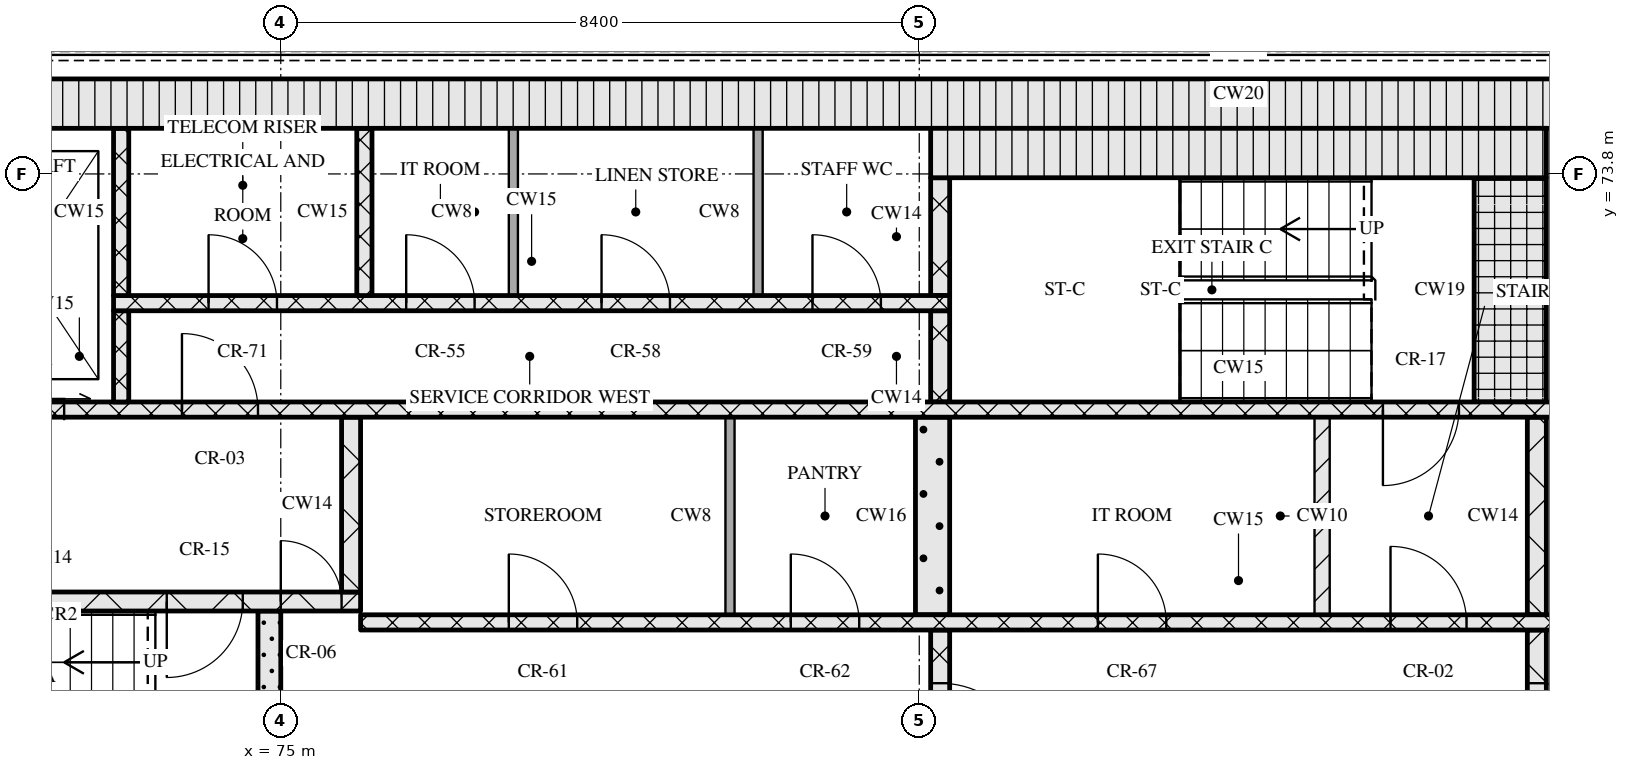
"""IFC4 building model, lengths in metres.
Left out: names, types, materials, properties, quantities, classifications, styles, units other than length and angle.
Written with IfcOpenShell. Run it as: python <this file> out.ifc"""

import sys

from ifc_helpers import new_model, si_unit, direction, frame, frame_2d, origin, place, context, subcontext, project, spatial, rectangle, extrude, element, fill, save


model = new_model("IFC4")
c1 = context("Model", 3, precision=1e-05, world=origin(), true_north=direction((0.0, 1.0)))
c2 = subcontext(c1, "Body", "Model", "MODEL_VIEW")
j1 = project(units=[si_unit("LENGTHUNIT", "METRE"), si_unit("PLANEANGLEUNIT", "RADIAN")], contexts=[c1])
p1 = place(None, origin())
s1 = spatial("IfcSite", under=j1, at=p1, CompositionType="ELEMENT")
p2 = place(p1, origin())
s2 = spatial("IfcBuilding", under=s1, at=p2, CompositionType="ELEMENT")
p3 = place(p2, frame((0.0, 0.0, 248.7)))
s3 = spatial("IfcBuildingStorey", under=s2, at=p3, CompositionType="ELEMENT", Elevation=248.7)
p4 = place(p3, frame((67.15, 74.725, 0.0), z_axis=(0.0, 0.0, 1.0), x_axis=(1.0, 0.0, 0.0)))
e1 = element("IfcWall", 1, at=p4, inside=s3, PredefinedType="SOLIDWALL", context=c2, shape_type="SweptSolid", body=[
    extrude(rectangle(XDim=40.9, YDim=0.65, at=frame_2d((20.45, 0.0))), origin(), (0.0, 0.0, 1.0), 3.3),
])
p5 = place(p3, frame((74.85, 65.2, 0.0), z_axis=(0.0, 0.0, 1.0), x_axis=(0.0, 1.0, 0.0)))
e2 = element("IfcWall", 2, at=p5, inside=s3, PredefinedType="SOLIDWALL", context=c2, shape_type="SweptSolid", body=[
    extrude(rectangle(XDim=2.85, YDim=0.3, at=frame_2d((1.425, 0.0))), origin(), (0.0, 0.0, 1.0), 3.3),
])
p6 = place(p3, frame((83.675, 65.2, 0.0), z_axis=(0.0, 0.0, 1.0), x_axis=(0.0, 1.0, 0.0)))
e3 = element("IfcWall", 3, at=p6, inside=s3, PredefinedType="SOLIDWALL", context=c2, shape_type="SweptSolid", body=[
    extrude(rectangle(XDim=2.6, YDim=0.25, at=frame_2d((1.3, 0.0))), origin(), (0.0, 0.0, 1.0), 3.3),
])
p7 = place(p6, frame((0.7, 0.0, 0.0)))
e4 = element("IfcOpeningElement", 4, at=p7, cuts=e3, PredefinedType="OPENING", context=c2, shape_type="SweptSolid", body=[
    extrude(rectangle(XDim=1.2, YDim=2.1, at=frame_2d((0.6, 1.05))), frame((0.0, 0.135, 0.0), z_axis=(0.0, -1.0, 0.0), x_axis=(1.0, 0.0, 0.0)), (0.0, 0.0, 1.0), 0.27),
])
p8 = place(p3, frame((91.525, 65.2, 0.0), z_axis=(0.0, 0.0, 1.0), x_axis=(0.0, 1.0, 0.0)))
e5 = element("IfcWall", 5, at=p8, inside=s3, PredefinedType="SOLIDWALL", context=c2, shape_type="SweptSolid", body=[
    extrude(rectangle(XDim=2.6, YDim=0.25, at=frame_2d((1.3, 0.0))), origin(), (0.0, 0.0, 1.0), 3.3),
])
p9 = place(p8, frame((0.7, 0.0, 0.0)))
e6 = element("IfcOpeningElement", 6, at=p9, cuts=e5, PredefinedType="OPENING", context=c2, shape_type="SweptSolid", body=[
    extrude(rectangle(XDim=1.2, YDim=2.1, at=frame_2d((0.6, 1.05))), frame((0.0, 0.135, 0.0), z_axis=(0.0, -1.0, 0.0), x_axis=(1.0, 0.0, 0.0)), (0.0, 0.0, 1.0), 0.27),
])
p10 = place(p3, frame((76.05, 67.9, 0.0), z_axis=(0.0, 0.0, 1.0), x_axis=(1.0, 0.0, 0.0)))
e7 = element("IfcWall", 7, at=p10, inside=s3, PredefinedType="SOLIDWALL", context=c2, shape_type="SweptSolid", body=[
    extrude(rectangle(XDim=23.1, YDim=0.2, at=frame_2d((11.55, 0.0))), origin(), (0.0, 0.0, 1.0), 3.3),
])
p11 = place(p10, frame((1.95, 0.0, 0.0)))
e8 = element("IfcOpeningElement", 8, at=p11, cuts=e7, PredefinedType="OPENING", context=c2, shape_type="SweptSolid", body=[
    extrude(rectangle(XDim=0.9, YDim=2.1, at=frame_2d((0.45, 1.05))), frame((0.0, 0.11, 0.0), z_axis=(0.0, -1.0, 0.0), x_axis=(1.0, 0.0, 0.0)), (0.0, 0.0, 1.0), 0.22),
])
p12 = place(p10, frame((5.66, 0.0, 0.0)))
e9 = element("IfcOpeningElement", 9, at=p12, cuts=e7, PredefinedType="OPENING", context=c2, shape_type="SweptSolid", body=[
    extrude(rectangle(XDim=0.9, YDim=2.1, at=frame_2d((0.45, 1.05))), frame((0.0, 0.11, 0.0), z_axis=(0.0, -1.0, 0.0), x_axis=(1.0, 0.0, 0.0)), (0.0, 0.0, 1.0), 0.22),
])
p13 = place(p10, frame((9.7, 0.0, 0.0)))
e10 = element("IfcOpeningElement", 10, at=p13, cuts=e7, PredefinedType="OPENING", context=c2, shape_type="SweptSolid", body=[
    extrude(rectangle(XDim=0.9, YDim=2.1, at=frame_2d((0.45, 1.05))), frame((0.0, 0.11, 0.0), z_axis=(0.0, -1.0, 0.0), x_axis=(1.0, 0.0, 0.0)), (0.0, 0.0, 1.0), 0.22),
])
p14 = place(p10, frame((13.55, 0.0, 0.0)))
e11 = element("IfcOpeningElement", 11, at=p14, cuts=e7, PredefinedType="OPENING", context=c2, shape_type="SweptSolid", body=[
    extrude(rectangle(XDim=1.0, YDim=2.1, at=frame_2d((0.5, 1.05))), frame((0.0, 0.11, 0.0), z_axis=(0.0, -1.0, 0.0), x_axis=(1.0, 0.0, 0.0)), (0.0, 0.0, 1.0), 0.22),
])
p15 = place(p10, frame((16.2, 0.0, 0.0)))
e12 = element("IfcOpeningElement", 12, at=p15, cuts=e7, PredefinedType="OPENING", context=c2, shape_type="SweptSolid", body=[
    extrude(rectangle(XDim=1.1, YDim=2.1, at=frame_2d((0.55, 1.05))), frame((0.0, 0.11, 0.0), z_axis=(0.0, -1.0, 0.0), x_axis=(1.0, 0.0, 0.0)), (0.0, 0.0, 1.0), 0.22),
])
p16 = place(p10, frame((18.7, 0.0, 0.0)))
e13 = element("IfcOpeningElement", 13, at=p16, cuts=e7, PredefinedType="OPENING", context=c2, shape_type="SweptSolid", body=[
    extrude(rectangle(XDim=1.1, YDim=2.1, at=frame_2d((0.55, 1.05))), frame((0.0, 0.11, 0.0), z_axis=(0.0, -1.0, 0.0), x_axis=(1.0, 0.0, 0.0)), (0.0, 0.0, 1.0), 0.22),
])
p17 = place(p10, frame((21.2, 0.0, 0.0)))
e14 = element("IfcOpeningElement", 14, at=p17, cuts=e7, PredefinedType="OPENING", context=c2, shape_type="SweptSolid", body=[
    extrude(rectangle(XDim=1.1, YDim=2.1, at=frame_2d((0.55, 1.05))), frame((0.0, 0.11, 0.0), z_axis=(0.0, -1.0, 0.0), x_axis=(1.0, 0.0, 0.0)), (0.0, 0.0, 1.0), 0.22),
])
p18 = place(p3, frame((80.91, 68.0, 0.0), z_axis=(0.0, 0.0, 1.0), x_axis=(0.0, 1.0, 0.0)))
e15 = element("IfcWall", 15, at=p18, inside=s3, PredefinedType="PARTITIONING", context=c2, shape_type="SweptSolid", body=[
    extrude(rectangle(XDim=2.6, YDim=0.12, at=frame_2d((1.3, 0.0))), origin(), (0.0, 0.0, 1.0), 3.3),
])
p19 = place(p3, frame((83.575, 68.0, 0.0), z_axis=(0.0, 0.0, 1.0), x_axis=(0.0, 1.0, 0.0)))
e16 = element("IfcWall", 16, at=p19, inside=s3, PredefinedType="SOLIDWALL", context=c2, shape_type="SweptSolid", body=[
    extrude(rectangle(XDim=2.6, YDim=0.45, at=frame_2d((1.3, 0.0))), origin(), (0.0, 0.0, 1.0), 3.3),
])
p20 = place(p3, frame((88.7, 68.0, 0.0), z_axis=(0.0, 0.0, 1.0), x_axis=(0.0, 1.0, 0.0)))
e17 = element("IfcWall", 17, at=p20, inside=s3, PredefinedType="PARTITIONING", context=c2, shape_type="SweptSolid", body=[
    extrude(rectangle(XDim=2.6, YDim=0.2, at=frame_2d((1.3, 0.0))), origin(), (0.0, 0.0, 1.0), 3.3),
])
p21 = place(p3, frame((91.525, 68.0, 0.0), z_axis=(0.0, 0.0, 1.0), x_axis=(0.0, 1.0, 0.0)))
e18 = element("IfcWall", 18, at=p21, inside=s3, PredefinedType="SOLIDWALL", context=c2, shape_type="SweptSolid", body=[
    extrude(rectangle(XDim=2.6, YDim=0.25, at=frame_2d((1.3, 0.0))), origin(), (0.0, 0.0, 1.0), 3.3),
])
p22 = place(p3, frame((67.8, 68.175, 0.0), z_axis=(0.0, 0.0, 1.0), x_axis=(1.0, 0.0, 0.0)))
e19 = element("IfcWall", 19, at=p22, inside=s3, PredefinedType="SOLIDWALL", context=c2, shape_type="SweptSolid", body=[
    extrude(rectangle(XDim=8.25, YDim=0.25, at=frame_2d((4.125, 0.0))), origin(), (0.0, 0.0, 1.0), 3.3),
])
p23 = place(p22, frame((5.7, 0.0, 0.0)))
e20 = element("IfcOpeningElement", 20, at=p23, cuts=e19, PredefinedType="OPENING", context=c2, shape_type="SweptSolid", body=[
    extrude(rectangle(XDim=1.0, YDim=2.1, at=frame_2d((0.5, 1.05))), frame((0.0, 0.135, 0.0), z_axis=(0.0, -1.0, 0.0), x_axis=(1.0, 0.0, 0.0)), (0.0, 0.0, 1.0), 0.27),
])
p24 = place(p22, frame((7.2, 0.0, 0.0)))
e21 = element("IfcOpeningElement", 21, at=p24, cuts=e19, PredefinedType="OPENING", context=c2, shape_type="SweptSolid", body=[
    extrude(rectangle(XDim=0.8, YDim=2.1, at=frame_2d((0.4, 1.05))), frame((0.0, 0.135, 0.0), z_axis=(0.0, -1.0, 0.0), x_axis=(1.0, 0.0, 0.0)), (0.0, 0.0, 1.0), 0.27),
])
p25 = place(p3, frame((75.925, 68.3, 0.0), z_axis=(0.0, 0.0, 1.0), x_axis=(0.0, 1.0, 0.0)))
e22 = element("IfcWall", 22, at=p25, inside=s3, PredefinedType="SOLIDWALL", context=c2, shape_type="SweptSolid", body=[
    extrude(rectangle(XDim=2.3, YDim=0.25, at=frame_2d((1.15, 0.0))), origin(), (0.0, 0.0, 1.0), 3.3),
])
p26 = place(p3, frame((67.8, 70.7, 0.0), z_axis=(0.0, 0.0, 1.0), x_axis=(1.0, 0.0, 0.0)))
e23 = element("IfcWall", 23, at=p26, inside=s3, PredefinedType="SOLIDWALL", context=c2, shape_type="SweptSolid", body=[
    extrude(rectangle(XDim=39.6, YDim=0.2, at=frame_2d((19.8, 0.0))), origin(), (0.0, 0.0, 1.0), 3.3),
])
p27 = place(p26, frame((0.65, 0.0, 0.0)))
e24 = element("IfcOpeningElement", 24, at=p27, cuts=e23, PredefinedType="OPENING", context=c2, shape_type="SweptSolid", body=[
    extrude(rectangle(XDim=1.1, YDim=2.1, at=frame_2d((0.55, 1.05))), frame((0.0, 0.11, 0.0), z_axis=(0.0, -1.0, 0.0), x_axis=(1.0, 0.0, 0.0)), (0.0, 0.0, 1.0), 0.22),
])
p28 = place(p26, frame((3.25, 0.0, 0.0)))
e25 = element("IfcOpeningElement", 25, at=p28, cuts=e23, PredefinedType="OPENING", context=c2, shape_type="SweptSolid", body=[
    extrude(rectangle(XDim=1.1, YDim=2.1, at=frame_2d((0.55, 1.05))), frame((0.0, 0.11, 0.0), z_axis=(0.0, -1.0, 0.0), x_axis=(1.0, 0.0, 0.0)), (0.0, 0.0, 1.0), 0.22),
])
p29 = place(p26, frame((5.9, 0.0, 0.0)))
e26 = element("IfcOpeningElement", 26, at=p29, cuts=e23, PredefinedType="OPENING", context=c2, shape_type="SweptSolid", body=[
    extrude(rectangle(XDim=1.0, YDim=2.1, at=frame_2d((0.5, 1.05))), frame((0.0, 0.11, 0.0), z_axis=(0.0, -1.0, 0.0), x_axis=(1.0, 0.0, 0.0)), (0.0, 0.0, 1.0), 0.22),
])
p30 = place(p26, frame((21.7, 0.0, 0.0)))
e27 = element("IfcOpeningElement", 27, at=p30, cuts=e23, PredefinedType="OPENING", context=c2, shape_type="SweptSolid", body=[
    extrude(rectangle(XDim=1.0, YDim=2.1, at=frame_2d((0.5, 1.05))), frame((0.0, 0.11, 0.0), z_axis=(0.0, -1.0, 0.0), x_axis=(1.0, 0.0, 0.0)), (0.0, 0.0, 1.0), 0.22),
])
p31 = place(p26, frame((32.7, 0.0, 0.0)))
e28 = element("IfcOpeningElement", 28, at=p31, cuts=e23, PredefinedType="OPENING", context=c2, shape_type="SweptSolid", body=[
    extrude(rectangle(XDim=1.0, YDim=2.1, at=frame_2d((0.5, 1.05))), frame((0.0, 0.11, 0.0), z_axis=(0.0, -1.0, 0.0), x_axis=(1.0, 0.0, 0.0)), (0.0, 0.0, 1.0), 0.22),
])
p32 = place(p26, frame((35.25, 0.0, 0.0)))
e29 = element("IfcOpeningElement", 29, at=p32, cuts=e23, PredefinedType="OPENING", context=c2, shape_type="SweptSolid", body=[
    extrude(rectangle(XDim=1.1, YDim=2.1, at=frame_2d((0.55, 1.05))), frame((0.0, 0.11, 0.0), z_axis=(0.0, -1.0, 0.0), x_axis=(1.0, 0.0, 0.0)), (0.0, 0.0, 1.0), 0.22),
])
p33 = place(p26, frame((37.85, 0.0, 0.0)))
e30 = element("IfcOpeningElement", 30, at=p33, cuts=e23, PredefinedType="OPENING", context=c2, shape_type="SweptSolid", body=[
    extrude(rectangle(XDim=1.1, YDim=2.1, at=frame_2d((0.55, 1.05))), frame((0.0, 0.11, 0.0), z_axis=(0.0, -1.0, 0.0), x_axis=(1.0, 0.0, 0.0)), (0.0, 0.0, 1.0), 0.22),
])
p34 = place(p3, frame((72.9, 70.8, 0.0), z_axis=(0.0, 0.0, 1.0), x_axis=(0.0, 1.0, 0.0)))
e31 = element("IfcWall", 31, at=p34, inside=s3, PredefinedType="SOLIDWALL", context=c2, shape_type="SweptSolid", body=[
    extrude(rectangle(XDim=1.2, YDim=0.2, at=frame_2d((0.6, 0.0))), origin(), (0.0, 0.0, 1.0), 3.3),
])
p35 = place(p3, frame((83.675, 70.8, 0.0), z_axis=(0.0, 0.0, 1.0), x_axis=(0.0, 1.0, 0.0)))
e32 = element("IfcWall", 32, at=p35, inside=s3, PredefinedType="SOLIDWALL", context=c2, shape_type="SweptSolid", body=[
    extrude(rectangle(XDim=1.2, YDim=0.25, at=frame_2d((0.6, 0.0))), origin(), (0.0, 0.0, 1.0), 3.3),
])
p36 = place(p3, frame((91.175, 70.8, 0.0), z_axis=(0.0, 0.0, 1.0), x_axis=(0.0, 1.0, 0.0)))
e33 = element("IfcWall", 33, at=p36, inside=s3, PredefinedType="SOLIDWALL", context=c2, shape_type="SweptSolid", body=[
    extrude(rectangle(XDim=2.95, YDim=0.95, at=frame_2d((1.475, 0.0))), origin(), (0.0, 0.0, 1.0), 3.3),
])
p37 = place(p3, frame((72.8, 72.1, 0.0), z_axis=(0.0, 0.0, 1.0), x_axis=(1.0, 0.0, 0.0)))
e34 = element("IfcWall", 34, at=p37, inside=s3, PredefinedType="SOLIDWALL", context=c2, shape_type="SweptSolid", body=[
    extrude(rectangle(XDim=11.0, YDim=0.2, at=frame_2d((5.5, 0.0))), origin(), (0.0, 0.0, 1.0), 3.3),
])
p38 = place(p37, frame((1.25, 0.0, 0.0)))
e35 = element("IfcOpeningElement", 35, at=p38, cuts=e34, PredefinedType="OPENING", context=c2, shape_type="SweptSolid", body=[
    extrude(rectangle(XDim=0.9, YDim=2.1, at=frame_2d((0.45, 1.05))), frame((0.0, 0.11, 0.0), z_axis=(0.0, -1.0, 0.0), x_axis=(1.0, 0.0, 0.0)), (0.0, 0.0, 1.0), 0.22),
])
p39 = place(p37, frame((3.85, 0.0, 0.0)))
e36 = element("IfcOpeningElement", 36, at=p39, cuts=e34, PredefinedType="OPENING", context=c2, shape_type="SweptSolid", body=[
    extrude(rectangle(XDim=0.9, YDim=2.1, at=frame_2d((0.45, 1.05))), frame((0.0, 0.11, 0.0), z_axis=(0.0, -1.0, 0.0), x_axis=(1.0, 0.0, 0.0)), (0.0, 0.0, 1.0), 0.22),
])
p40 = place(p37, frame((6.42, 0.0, 0.0)))
e37 = element("IfcOpeningElement", 37, at=p40, cuts=e34, PredefinedType="OPENING", context=c2, shape_type="SweptSolid", body=[
    extrude(rectangle(XDim=0.9, YDim=2.1, at=frame_2d((0.45, 1.05))), frame((0.0, 0.11, 0.0), z_axis=(0.0, -1.0, 0.0), x_axis=(1.0, 0.0, 0.0)), (0.0, 0.0, 1.0), 0.22),
])
p41 = place(p37, frame((9.195, 0.0, 0.0)))
e38 = element("IfcOpeningElement", 38, at=p41, cuts=e34, PredefinedType="OPENING", context=c2, shape_type="SweptSolid", body=[
    extrude(rectangle(XDim=0.9, YDim=2.1, at=frame_2d((0.45, 1.05))), frame((0.0, 0.11, 0.0), z_axis=(0.0, -1.0, 0.0), x_axis=(1.0, 0.0, 0.0)), (0.0, 0.0, 1.0), 0.22),
])
for number, where, z_axis, x_axis in (
    (39, (72.9, 72.2, 0.0), (0.0, 0.0, 1.0), (0.0, 1.0, 0.0)),
    (40, (76.1, 72.2, 0.0), (0.0, 0.0, 1.0), (0.0, 1.0, 0.0)),
):
    element("IfcWall", number, at=place(p3, frame(where, z_axis=z_axis, x_axis=x_axis)), inside=s3, PredefinedType="SOLIDWALL", context=c2, shape_type="SweptSolid", body=[
        extrude(rectangle(XDim=2.2, YDim=0.2, at=frame_2d((1.1, 0.0))), origin(), (0.0, 0.0, 1.0), 3.3),
    ])
for number, where, z_axis, x_axis in (
    (41, (78.06, 72.2, 0.0), (0.0, 0.0, 1.0), (0.0, 1.0, 0.0)),
    (42, (81.28, 72.2, 0.0), (0.0, 0.0, 1.0), (0.0, 1.0, 0.0)),
):
    element("IfcWall", number, at=place(p3, frame(where, z_axis=z_axis, x_axis=x_axis)), inside=s3, PredefinedType="PARTITIONING", context=c2, shape_type="SweptSolid", body=[
        extrude(rectangle(XDim=2.2, YDim=0.12, at=frame_2d((1.1, 0.0))), origin(), (0.0, 0.0, 1.0), 3.3),
    ])
p42 = place(p3, frame((83.675, 72.2, 0.0), z_axis=(0.0, 0.0, 1.0), x_axis=(0.0, 1.0, 0.0)))
e43 = element("IfcWall", 43, at=p42, inside=s3, PredefinedType="SOLIDWALL", context=c2, shape_type="SweptSolid", body=[
    extrude(rectangle(XDim=1.55, YDim=0.25, at=frame_2d((0.775, 0.0))), origin(), (0.0, 0.0, 1.0), 3.3),
])
p43 = place(p3, frame((83.55, 74.075, 0.0), z_axis=(0.0, 0.0, 1.0), x_axis=(1.0, 0.0, 0.0)))
e44 = element("IfcWall", 44, at=p43, inside=s3, PredefinedType="SOLIDWALL", context=c2, shape_type="SweptSolid", body=[
    extrude(rectangle(XDim=8.1, YDim=0.65, at=frame_2d((4.05, 0.0))), origin(), (0.0, 0.0, 1.0), 3.3),
])
p44 = place(p7, origin())
e45 = element("IfcDoor", 45, at=p44, inside=s3, OperationType="SINGLE_SWING_RIGHT", PredefinedType="DOOR", context=c2, shape_type="SweptSolid", body=[
    extrude(rectangle(XDim=1.2, YDim=2.1, at=frame_2d((0.6, 1.05))), frame((0.0, 0.025, 0.0), z_axis=(0.0, -1.0, 0.0), x_axis=(1.0, 0.0, 0.0)), (0.0, 0.0, 1.0), 0.05),
])
fill(e4, e45)
p45 = place(p9, origin())
e46 = element("IfcDoor", 46, at=p45, inside=s3, OperationType="SINGLE_SWING_RIGHT", PredefinedType="DOOR", context=c2, shape_type="SweptSolid", body=[
    extrude(rectangle(XDim=1.2, YDim=2.1, at=frame_2d((0.6, 1.05))), frame((0.0, 0.025, 0.0), z_axis=(0.0, -1.0, 0.0), x_axis=(1.0, 0.0, 0.0)), (0.0, 0.0, 1.0), 0.05),
])
fill(e6, e46)
p46 = place(p11, origin())
e47 = element("IfcDoor", 47, at=p46, inside=s3, OperationType="SINGLE_SWING_LEFT", PredefinedType="DOOR", context=c2, shape_type="SweptSolid", body=[
    extrude(rectangle(XDim=0.9, YDim=2.1, at=frame_2d((0.45, 1.05))), frame((0.0, 0.025, 0.0), z_axis=(0.0, -1.0, 0.0), x_axis=(1.0, 0.0, 0.0)), (0.0, 0.0, 1.0), 0.05),
])
fill(e8, e47)
p47 = place(p12, origin())
e48 = element("IfcDoor", 48, at=p47, inside=s3, OperationType="SINGLE_SWING_LEFT", PredefinedType="DOOR", context=c2, shape_type="SweptSolid", body=[
    extrude(rectangle(XDim=0.9, YDim=2.1, at=frame_2d((0.45, 1.05))), frame((0.0, 0.025, 0.0), z_axis=(0.0, -1.0, 0.0), x_axis=(1.0, 0.0, 0.0)), (0.0, 0.0, 1.0), 0.05),
])
fill(e9, e48)
p48 = place(p13, origin())
e49 = element("IfcDoor", 49, at=p48, inside=s3, OperationType="SINGLE_SWING_LEFT", PredefinedType="DOOR", context=c2, shape_type="SweptSolid", body=[
    extrude(rectangle(XDim=0.9, YDim=2.1, at=frame_2d((0.45, 1.05))), frame((0.0, 0.025, 0.0), z_axis=(0.0, -1.0, 0.0), x_axis=(1.0, 0.0, 0.0)), (0.0, 0.0, 1.0), 0.05),
])
fill(e10, e49)
p49 = place(p14, origin())
e50 = element("IfcDoor", 50, at=p49, inside=s3, OperationType="SINGLE_SWING_LEFT", PredefinedType="DOOR", context=c2, shape_type="SweptSolid", body=[
    extrude(rectangle(XDim=1.0, YDim=2.1, at=frame_2d((0.5, 1.05))), frame((0.0, 0.025, 0.0), z_axis=(0.0, -1.0, 0.0), x_axis=(1.0, 0.0, 0.0)), (0.0, 0.0, 1.0), 0.05),
])
fill(e11, e50)
p50 = place(p23, origin())
e51 = element("IfcDoor", 51, at=p50, inside=s3, OperationType="SINGLE_SWING_RIGHT", PredefinedType="DOOR", context=c2, shape_type="SweptSolid", body=[
    extrude(rectangle(XDim=1.0, YDim=2.1, at=frame_2d((0.5, 1.05))), frame((0.0, 0.025, 0.0), z_axis=(0.0, -1.0, 0.0), x_axis=(1.0, 0.0, 0.0)), (0.0, 0.0, 1.0), 0.05),
])
fill(e20, e51)
p51 = place(p24, origin())
e52 = element("IfcDoor", 52, at=p51, inside=s3, OperationType="SINGLE_SWING_LEFT", PredefinedType="DOOR", context=c2, shape_type="SweptSolid", body=[
    extrude(rectangle(XDim=0.8, YDim=2.1, at=frame_2d((0.4, 1.05))), frame((0.0, 0.025, 0.0), z_axis=(0.0, -1.0, 0.0), x_axis=(1.0, 0.0, 0.0)), (0.0, 0.0, 1.0), 0.05),
])
fill(e21, e52)
p52 = place(p28, origin())
e53 = element("IfcDoor", 53, at=p52, inside=s3, OperationType="SLIDING_TO_RIGHT", PredefinedType="DOOR", context=c2, shape_type="SweptSolid", body=[
    extrude(rectangle(XDim=1.1, YDim=2.1, at=frame_2d((0.55, 1.05))), frame((0.0, 0.025, 0.0), z_axis=(0.0, -1.0, 0.0), x_axis=(1.0, 0.0, 0.0)), (0.0, 0.0, 1.0), 0.05),
])
fill(e25, e53)
p53 = place(p29, origin())
e54 = element("IfcDoor", 54, at=p53, inside=s3, OperationType="SINGLE_SWING_LEFT", PredefinedType="DOOR", context=c2, shape_type="SweptSolid", body=[
    extrude(rectangle(XDim=1.0, YDim=2.1, at=frame_2d((0.5, 1.05))), frame((0.0, 0.025, 0.0), z_axis=(0.0, -1.0, 0.0), x_axis=(1.0, 0.0, 0.0)), (0.0, 0.0, 1.0), 0.05),
])
fill(e26, e54)
p54 = place(p30, origin())
e55 = element("IfcDoor", 55, at=p54, inside=s3, OperationType="SINGLE_SWING_RIGHT", PredefinedType="DOOR", context=c2, shape_type="SweptSolid", body=[
    extrude(rectangle(XDim=1.0, YDim=2.1, at=frame_2d((0.5, 1.05))), frame((0.0, 0.025, 0.0), z_axis=(0.0, -1.0, 0.0), x_axis=(1.0, 0.0, 0.0)), (0.0, 0.0, 1.0), 0.05),
])
fill(e27, e55)
p55 = place(p38, origin())
e56 = element("IfcDoor", 56, at=p55, inside=s3, OperationType="SINGLE_SWING_LEFT", PredefinedType="DOOR", context=c2, shape_type="SweptSolid", body=[
    extrude(rectangle(XDim=0.9, YDim=2.1, at=frame_2d((0.45, 1.05))), frame((0.0, 0.025, 0.0), z_axis=(0.0, -1.0, 0.0), x_axis=(1.0, 0.0, 0.0)), (0.0, 0.0, 1.0), 0.05),
])
fill(e35, e56)
p56 = place(p39, origin())
e57 = element("IfcDoor", 57, at=p56, inside=s3, OperationType="SINGLE_SWING_LEFT", PredefinedType="DOOR", context=c2, shape_type="SweptSolid", body=[
    extrude(rectangle(XDim=0.9, YDim=2.1, at=frame_2d((0.45, 1.05))), frame((0.0, 0.025, 0.0), z_axis=(0.0, -1.0, 0.0), x_axis=(1.0, 0.0, 0.0)), (0.0, 0.0, 1.0), 0.05),
])
fill(e36, e57)
p57 = place(p40, origin())
e58 = element("IfcDoor", 58, at=p57, inside=s3, OperationType="SINGLE_SWING_LEFT", PredefinedType="DOOR", context=c2, shape_type="SweptSolid", body=[
    extrude(rectangle(XDim=0.9, YDim=2.1, at=frame_2d((0.45, 1.05))), frame((0.0, 0.025, 0.0), z_axis=(0.0, -1.0, 0.0), x_axis=(1.0, 0.0, 0.0)), (0.0, 0.0, 1.0), 0.05),
])
fill(e37, e58)
p58 = place(p41, origin())
e59 = element("IfcDoor", 59, at=p58, inside=s3, OperationType="SINGLE_SWING_LEFT", PredefinedType="DOOR", context=c2, shape_type="SweptSolid", body=[
    extrude(rectangle(XDim=0.9, YDim=2.1, at=frame_2d((0.45, 1.05))), frame((0.0, 0.025, 0.0), z_axis=(0.0, -1.0, 0.0), x_axis=(1.0, 0.0, 0.0)), (0.0, 0.0, 1.0), 0.05),
])
fill(e38, e59)
save(model, sys.argv[1])
